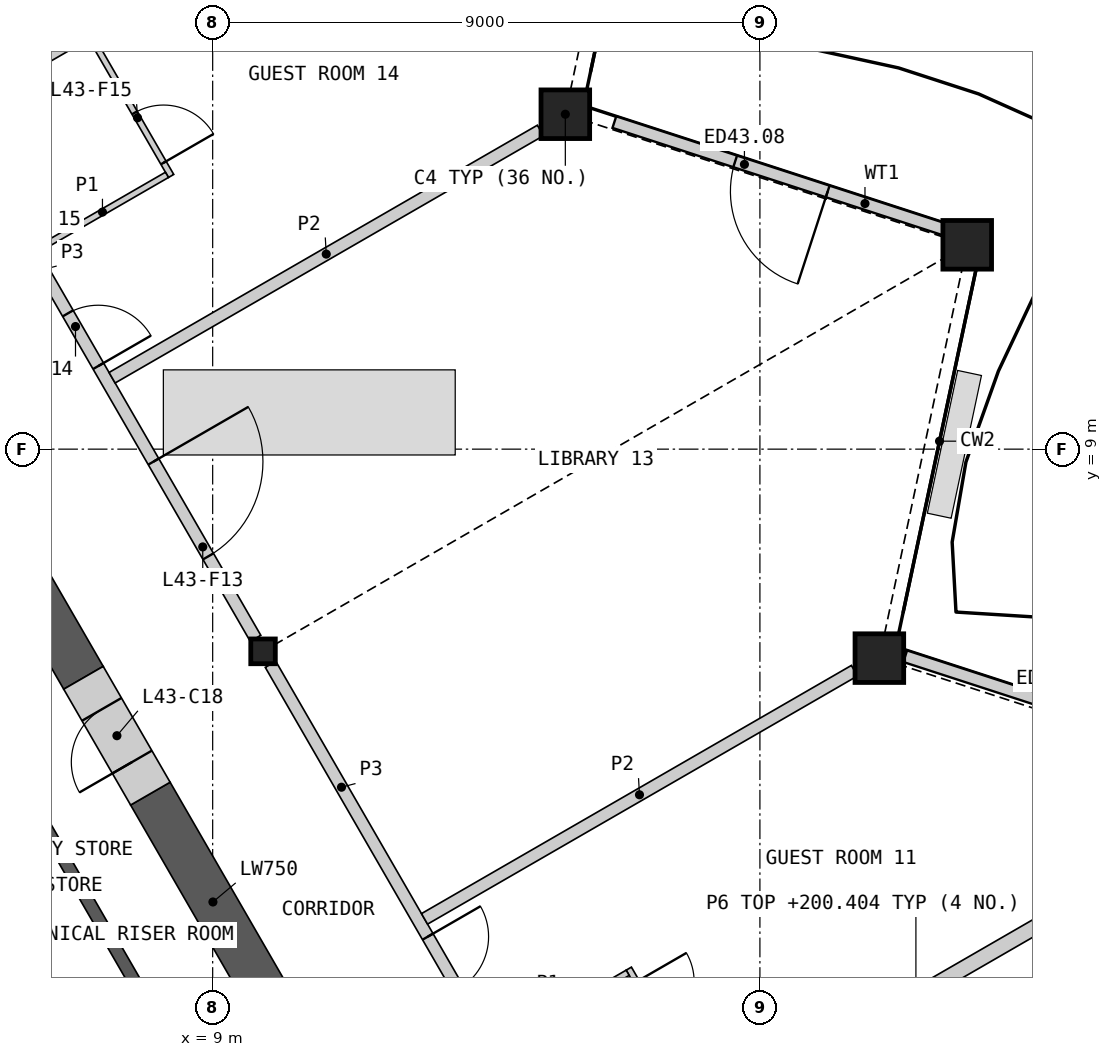
"""IFC4 building model, lengths in metres.
Left out: names, types, materials, properties, quantities, classifications, styles, units other than length and angle.
Written with IfcOpenShell. Run it as: python <this file> out.ifc"""

import sys

from ifc_helpers import new_model, si_unit, direction, frame, frame_2d, origin, origin_2d, place, context, subcontext, project, spatial, polyline, rectangle, hollow_rectangle, i_section, outline, extrude, element, fill, save


model = new_model("IFC4")
c1 = context("Model", 3, precision=1e-05, world=origin(), true_north=direction((0.0, 1.0)))
c2 = subcontext(c1, "Body", "Model", "MODEL_VIEW")
j1 = project(units=[si_unit("LENGTHUNIT", "METRE"), si_unit("PLANEANGLEUNIT", "RADIAN")], contexts=[c1])
p1 = place(None, origin())
s1 = spatial("IfcSite", under=j1, at=p1, CompositionType="ELEMENT")
p2 = place(p1, origin())
s2 = spatial("IfcBuilding", under=s1, at=p2, CompositionType="ELEMENT")
p3 = place(p2, frame((0.0, 0.0, 198.0)))
s3 = spatial("IfcBuildingStorey", under=s2, at=p3, CompositionType="ELEMENT", Elevation=198.0)
for number, where, z_axis, x_axis in (
    (1, (19.965, 5.563, 0.0), (0.0, 0.0, 1.0), (1.0, 0.0, 0.0)),
    (2, (21.409, 12.361, 0.0), (0.0, 0.0, 1.0), (1.0, 0.0, 0.0)),
    (3, (14.8, 14.508, 0.0), (0.0, 0.0, 1.0), (1.0, 0.0, 0.0)),
):
    element("IfcColumn", number, at=place(p3, frame(where, z_axis=z_axis, x_axis=x_axis)), inside=s3, PredefinedType="COLUMN", context=c2, shape_type="SweptSolid", body=[
        extrude(hollow_rectangle(XDim=0.8, YDim=0.8, WallThickness=0.05, at=origin_2d()), origin(), (0.0, 0.0, 1.0), 3.6),
    ])
p4 = place(p3, frame((9.828, 5.675, 0.0), z_axis=(0.0, 0.0, 1.0), x_axis=(1.0, 0.0, 0.0)))
e4 = element("IfcColumn", 4, at=p4, inside=s3, PredefinedType="COLUMN", context=c2, shape_type="SweptSolid", body=[
    extrude(i_section(OverallWidth=0.404, OverallDepth=0.407, WebThickness=0.027, FlangeThickness=0.044, at=origin_2d()), origin(), (0.0, 0.0, 1.0), 3.6),
])
p5 = place(p3, frame((26.24, 3.693, 0.0), z_axis=(0.0, 0.0, 1.0), x_axis=(-0.951053023356, 0.30902774433, 0.0)))
e5 = element("IfcWall", 5, at=p5, inside=s3, PredefinedType="SOLIDWALL", context=c2, shape_type="SweptSolid", body=[
    extrude(rectangle(XDim=6.152, YDim=0.2, at=frame_2d((3.076, 0.0))), origin(), (0.0, 0.0, 1.0), 2.701),
])
p6 = place(p5, frame((2.089, 0.0, 0.0)))
e6 = element("IfcOpeningElement", 6, at=p6, cuts=e5, PredefinedType="OPENING", context=c2, shape_type="SweptSolid", body=[
    extrude(rectangle(XDim=1.6, YDim=2.4, at=frame_2d((0.8, 1.2))), frame((0.0, 0.11, 0.0), z_axis=(0.0, -1.0, 0.0), x_axis=(1.0, 0.0, 0.0)), (0.0, 0.0, 1.0), 0.22),
])
p7 = place(p3, frame((21.102, 12.593, 0.0), z_axis=(0.0, 0.0, 1.0), x_axis=(-0.951059834965, 0.309006780371, 0.0)))
e7 = element("IfcWall", 7, at=p7, inside=s3, PredefinedType="SOLIDWALL", context=c2, shape_type="SweptSolid", body=[
    extrude(rectangle(XDim=5.779, YDim=0.2, at=frame_2d((2.889, 0.0))), origin(), (0.0, 0.0, 1.0), 2.701),
])
p8 = place(p7, frame((2.089, 0.0, 0.0)))
e8 = element("IfcOpeningElement", 8, at=p8, cuts=e7, PredefinedType="OPENING", context=c2, shape_type="SweptSolid", body=[
    extrude(rectangle(XDim=1.6, YDim=2.4, at=frame_2d((0.8, 1.2))), frame((0.0, 0.11, 0.0), z_axis=(0.0, -1.0, 0.0), x_axis=(1.0, 0.0, 0.0)), (0.0, 0.0, 1.0), 0.22),
])
p9 = place(p3, origin())
e9 = element("IfcWall", 9, at=p9, inside=s3, PredefinedType="SHEAR", context=c2, shape_type="SweptSolid", body=[
    extrude(outline(polyline([(1.561, 6.097), (3.731, 7.35), (8.231, -0.444), (6.061, -1.697), (5.96, -1.524), (7.952, -0.374), (4.752, 5.169), (2.76, 4.019), (2.66, 4.192), (4.652, 5.342), (3.652, 7.074), (1.66, 5.924), (1.561, 6.097)])), origin(), (0.0, 0.0, 1.0), 3.25),
])
p10 = place(p3, frame((6.875, 5.24, 0.0), z_axis=(0.0, 0.0, 1.0), x_axis=(-0.499997217876, 0.866027010039, 0.0)))
e10 = element("IfcWall", 10, at=p10, inside=s3, PredefinedType="SHEAR", context=c2, shape_type="SweptSolid", body=[
    extrude(rectangle(XDim=13.101, YDim=0.75, at=frame_2d((6.551, 0.0))), origin(), (0.0, 0.0, 1.0), 3.25),
])
p11 = place(p3, frame((10.033, -0.23, 0.0), z_axis=(0.0, 0.0, 1.0), x_axis=(-0.500030520673, 0.866007781949, 0.0)))
e11 = element("IfcWall", 11, at=p11, inside=s3, PredefinedType="SHEAR", context=c2, shape_type="SweptSolid", body=[
    extrude(rectangle(XDim=4.116, YDim=0.75, at=frame_2d((2.058, 0.0))), origin(), (0.0, 0.0, 1.0), 3.25),
])
p12 = place(p3, frame((7.975, 3.334, 0.0), z_axis=(0.0, 0.0, 1.0), x_axis=(-0.500077893725, 0.86598042715, 0.0)))
e12 = element("IfcWall", 12, at=p12, inside=s3, PredefinedType="SHEAR", context=c2, shape_type="SweptSolid", body=[
    extrude(rectangle(XDim=2.2, YDim=0.75, at=frame_2d((1.1, 0.0))), origin(), (0.0, 0.0, 1.0), 3.25),
])
p13 = place(p12, frame((0.6, 0.0, 0.0)))
e13 = element("IfcOpeningElement", 13, at=p13, cuts=e12, PredefinedType="OPENING", context=c2, shape_type="SweptSolid", body=[
    extrude(rectangle(XDim=1.0, YDim=2.1, at=frame_2d((0.5, 1.05))), frame((0.0, 0.385, 0.0), z_axis=(0.0, -1.0, 0.0), x_axis=(1.0, 0.0, 0.0)), (0.0, 0.0, 1.0), 0.77),
])
p14 = place(p3, frame((14.967, -3.226, 0.0), z_axis=(0.0, 0.0, 1.0), x_axis=(0.866030250269, 0.499991605548, 0.0)))
e14 = element("IfcWall", 14, at=p14, inside=s3, PredefinedType="PARTITIONING", context=c2, shape_type="SweptSolid", body=[
    extrude(rectangle(XDim=12.929, YDim=0.25, at=frame_2d((6.465, 0.0))), origin(), (0.0, 0.0, 1.0), 2.404),
])
p15 = place(p3, frame((4.582, 14.512, 0.0), z_axis=(0.0, 0.0, 1.0), x_axis=(0.866027263711, 0.4999967785, 0.0)))
e15 = element("IfcWall", 15, at=p15, inside=s3, PredefinedType="PARTITIONING", context=c2, shape_type="SweptSolid", body=[
    extrude(rectangle(XDim=12.994, YDim=0.25, at=frame_2d((6.497, 0.0))), origin(), (0.0, 0.0, 1.0), 2.404),
])
p16 = place(p3, frame((5.038, 13.972, 0.0), z_axis=(0.0, 0.0, 1.0), x_axis=(0.50000393355, -0.866023132736, 0.0)))
e16 = element("IfcWall", 16, at=p16, inside=s3, PredefinedType="PARTITIONING", context=c2, shape_type="SweptSolid", body=[
    extrude(rectangle(XDim=9.335, YDim=0.2, at=frame_2d((4.667, 0.0))), origin(), (0.0, 0.0, 1.0), 3.25),
])
p17 = place(p16, frame((5.979, 0.0, 0.0)))
e17 = element("IfcOpeningElement", 17, at=p17, cuts=e16, PredefinedType="OPENING", context=c2, shape_type="SweptSolid", body=[
    extrude(rectangle(XDim=1.8, YDim=2.1, at=frame_2d((0.9, 1.05))), frame((0.0, 0.11, 0.0), z_axis=(0.0, -1.0, 0.0), x_axis=(1.0, 0.0, 0.0)), (0.0, 0.0, 1.0), 0.22),
])
p18 = place(p16, frame((3.163, 0.0, 0.0)))
e18 = element("IfcOpeningElement", 18, at=p18, cuts=e16, PredefinedType="OPENING", context=c2, shape_type="SweptSolid", body=[
    extrude(rectangle(XDim=1.0, YDim=2.1, at=frame_2d((0.5, 1.05))), frame((0.0, 0.11, 0.0), z_axis=(0.0, -1.0, 0.0), x_axis=(1.0, 0.0, 0.0)), (0.0, 0.0, 1.0), 0.22),
])
p19 = place(p3, frame((9.952, 5.461, 0.0), z_axis=(0.0, 0.0, 1.0), x_axis=(0.50000393355, -0.866023132736, 0.0)))
e19 = element("IfcWall", 19, at=p19, inside=s3, PredefinedType="PARTITIONING", context=c2, shape_type="SweptSolid", body=[
    extrude(rectangle(XDim=9.335, YDim=0.2, at=frame_2d((4.667, 0.0))), origin(), (0.0, 0.0, 1.0), 3.25),
])
p20 = place(p19, frame((5.172, 0.0, 0.0)))
e20 = element("IfcOpeningElement", 20, at=p20, cuts=e19, PredefinedType="OPENING", context=c2, shape_type="SweptSolid", body=[
    extrude(rectangle(XDim=1.0, YDim=2.1, at=frame_2d((0.5, 1.05))), frame((0.0, 0.11, 0.0), z_axis=(0.0, -1.0, 0.0), x_axis=(1.0, 0.0, 0.0)), (0.0, 0.0, 1.0), 0.22),
])
p21 = place(p3, frame((12.484, 1.274, 0.0), z_axis=(0.0, 0.0, 1.0), x_axis=(0.866026229868, 0.499998569178, 0.0)))
e21 = element("IfcWall", 21, at=p21, inside=s3, PredefinedType="PARTITIONING", context=c2, shape_type="SweptSolid", body=[
    extrude(rectangle(XDim=8.164, YDim=0.2, at=frame_2d((4.082, 0.0))), origin(), (0.0, 0.0, 1.0), 2.404),
])
p22 = place(p3, frame((7.346, 10.175, 0.0), z_axis=(0.0, 0.0, 1.0), x_axis=(0.86602913801, 0.499993532075, 0.0)))
e22 = element("IfcWall", 22, at=p22, inside=s3, PredefinedType="PARTITIONING", context=c2, shape_type="SweptSolid", body=[
    extrude(rectangle(XDim=8.134, YDim=0.2, at=frame_2d((4.067, 0.0))), origin(), (0.0, 0.0, 1.0), 2.404),
])
p23 = place(p3, frame((15.844, 0.456, 0.0), z_axis=(0.0, 0.0, 1.0), x_axis=(0.500006934395, -0.866021400173, 0.0)))
e23 = element("IfcWall", 23, at=p23, inside=s3, PredefinedType="PARTITIONING", context=c2, shape_type="SweptSolid", body=[
    extrude(rectangle(XDim=5.2, YDim=0.1, at=frame_2d((2.6, 0.0))), origin(), (0.0, 0.0, 1.0), 2.404),
])
p24 = place(p23, frame((4.0, 0.0, 0.0)))
e24 = element("IfcOpeningElement", 24, at=p24, cuts=e23, PredefinedType="OPENING", context=c2, shape_type="SweptSolid", body=[
    extrude(rectangle(XDim=0.95, YDim=2.1, at=frame_2d((0.475, 1.05))), frame((0.0, 0.06, 0.0), z_axis=(0.0, -1.0, 0.0), x_axis=(1.0, 0.0, 0.0)), (0.0, 0.0, 1.0), 0.12),
])
p25 = place(p23, frame((0.25, 0.0, 0.0)))
e25 = element("IfcOpeningElement", 25, at=p25, cuts=e23, PredefinedType="OPENING", context=c2, shape_type="SweptSolid", body=[
    extrude(rectangle(XDim=0.95, YDim=2.1, at=frame_2d((0.475, 1.05))), frame((0.0, 0.06, 0.0), z_axis=(0.0, -1.0, 0.0), x_axis=(1.0, 0.0, 0.0)), (0.0, 0.0, 1.0), 0.12),
])
p26 = place(p3, frame((5.717, 17.996, 0.0), z_axis=(0.0, 0.0, 1.0), x_axis=(0.500027264788, -0.866009661879, 0.0)))
e26 = element("IfcWall", 26, at=p26, inside=s3, PredefinedType="PARTITIONING", context=c2, shape_type="SweptSolid", body=[
    extrude(rectangle(XDim=5.2, YDim=0.1, at=frame_2d((2.6, 0.0))), origin(), (0.0, 0.0, 1.0), 2.404),
])
p27 = place(p26, frame((4.0, 0.0, 0.0)))
e27 = element("IfcOpeningElement", 27, at=p27, cuts=e26, PredefinedType="OPENING", context=c2, shape_type="SweptSolid", body=[
    extrude(rectangle(XDim=0.95, YDim=2.1, at=frame_2d((0.475, 1.05))), frame((0.0, 0.06, 0.0), z_axis=(0.0, -1.0, 0.0), x_axis=(1.0, 0.0, 0.0)), (0.0, 0.0, 1.0), 0.12),
])
p28 = place(p26, frame((0.25, 0.0, 0.0)))
e28 = element("IfcOpeningElement", 28, at=p28, cuts=e26, PredefinedType="OPENING", context=c2, shape_type="SweptSolid", body=[
    extrude(rectangle(XDim=0.95, YDim=2.1, at=frame_2d((0.475, 1.05))), frame((0.0, 0.06, 0.0), z_axis=(0.0, -1.0, 0.0), x_axis=(1.0, 0.0, 0.0)), (0.0, 0.0, 1.0), 0.12),
])
p29 = place(p3, frame((6.126, 12.286, 0.0), z_axis=(0.0, 0.0, 1.0), x_axis=(0.866014668023, 0.500018594424, 0.0)))
e29 = element("IfcWall", 29, at=p29, inside=s3, PredefinedType="PARTITIONING", context=c2, shape_type="SweptSolid", body=[
    extrude(rectangle(XDim=2.45, YDim=0.1, at=frame_2d((1.225, 0.0))), origin(), (0.0, 0.0, 1.0), 2.404),
])
p30 = place(p3, frame((13.704, -0.837, 0.0), z_axis=(0.0, 0.0, 1.0), x_axis=(0.865989751695, 0.500061746146, 0.0)))
e30 = element("IfcWall", 30, at=p30, inside=s3, PredefinedType="PARTITIONING", context=c2, shape_type="SweptSolid", body=[
    extrude(rectangle(XDim=2.45, YDim=0.1, at=frame_2d((1.225, 0.0))), origin(), (0.0, 0.0, 1.0), 2.404),
])
p31 = place(p8, origin())
e31 = element("IfcDoor", 31, at=p31, inside=s3, OperationType="DOUBLE_DOOR_SINGLE_SWING", PredefinedType="DOOR", context=c2, shape_type="SweptSolid", body=[
    extrude(rectangle(XDim=1.6, YDim=2.4, at=frame_2d((0.8, 1.2))), frame((0.0, 0.025, 0.0), z_axis=(0.0, -1.0, 0.0), x_axis=(1.0, 0.0, 0.0)), (0.0, 0.0, 1.0), 0.05),
])
fill(e8, e31)
p32 = place(p13, origin())
e32 = element("IfcDoor", 32, at=p32, inside=s3, OperationType="SINGLE_SWING_LEFT", PredefinedType="DOOR", context=c2, shape_type="SweptSolid", body=[
    extrude(rectangle(XDim=1.0, YDim=2.1, at=frame_2d((0.5, 1.05))), frame((0.0, 0.13, 0.0), z_axis=(0.0, -1.0, 0.0), x_axis=(1.0, 0.0, 0.0)), (0.0, 0.0, 1.0), 0.05),
])
fill(e13, e32)
p33 = place(p20, origin())
e33 = element("IfcDoor", 33, at=p33, inside=s3, OperationType="SINGLE_SWING_LEFT", PredefinedType="DOOR", context=c2, shape_type="SweptSolid", body=[
    extrude(rectangle(XDim=1.0, YDim=2.1, at=frame_2d((0.5, 1.05))), frame((0.0, 0.025, 0.0), z_axis=(0.0, -1.0, 0.0), x_axis=(1.0, 0.0, 0.0)), (0.0, 0.0, 1.0), 0.05),
])
fill(e20, e33)
p34 = place(p17, origin())
e34 = element("IfcDoor", 34, at=p34, inside=s3, OperationType="DOUBLE_DOOR_SINGLE_SWING", PredefinedType="DOOR", context=c2, shape_type="SweptSolid", body=[
    extrude(rectangle(XDim=1.8, YDim=2.1, at=frame_2d((0.9, 1.05))), frame((0.0, 0.025, 0.0), z_axis=(0.0, -1.0, 0.0), x_axis=(1.0, 0.0, 0.0)), (0.0, 0.0, 1.0), 0.05),
])
fill(e17, e34)
p35 = place(p18, origin())
e35 = element("IfcDoor", 35, at=p35, inside=s3, OperationType="SINGLE_SWING_RIGHT", PredefinedType="DOOR", context=c2, shape_type="SweptSolid", body=[
    extrude(rectangle(XDim=1.0, YDim=2.1, at=frame_2d((0.5, 1.05))), frame((0.0, 0.025, 0.0), z_axis=(0.0, -1.0, 0.0), x_axis=(1.0, 0.0, 0.0)), (0.0, 0.0, 1.0), 0.05),
])
fill(e18, e35)
p36 = place(p27, origin())
e36 = element("IfcDoor", 36, at=p36, inside=s3, OperationType="SINGLE_SWING_RIGHT", PredefinedType="DOOR", context=c2, shape_type="SweptSolid", body=[
    extrude(rectangle(XDim=0.95, YDim=2.1, at=frame_2d((0.475, 1.05))), frame((0.0, 0.025, 0.0), z_axis=(0.0, -1.0, 0.0), x_axis=(1.0, 0.0, 0.0)), (0.0, 0.0, 1.0), 0.05),
])
fill(e27, e36)
save(model, sys.argv[1])
